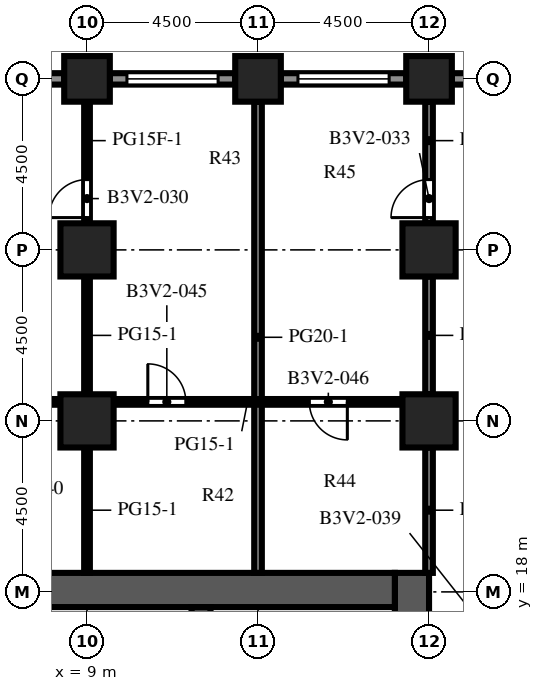
"""IFC4 building model, lengths in metres.
Left out: names, types, materials, properties, quantities, classifications, styles, units other than length and angle.
Written with IfcOpenShell. Run it as: python <this file> out.ifc"""

import sys

from ifc_helpers import new_model, si_unit, direction, frame, frame_2d, origin, origin_2d, place, context, subcontext, project, spatial, rectangle, extrude, element, fill, save


model = new_model("IFC4")
c1 = context("Model", 3, precision=1e-05, world=origin(), true_north=direction((0.0, 1.0)))
c2 = subcontext(c1, "Body", "Model", "MODEL_VIEW")
j1 = project(units=[si_unit("LENGTHUNIT", "METRE"), si_unit("PLANEANGLEUNIT", "RADIAN")], contexts=[c1])
p1 = place(None, origin())
s1 = spatial("IfcSite", under=j1, at=p1, CompositionType="ELEMENT")
p2 = place(p1, origin())
s2 = spatial("IfcBuilding", under=s1, at=p2, CompositionType="ELEMENT")
p3 = place(p2, frame((0.0, 0.0, 98.4)))
s3 = spatial("IfcBuildingStorey", under=s2, at=p3, CompositionType="ELEMENT", Elevation=98.4)
for number, where, z_axis, x_axis in (
    (1, (9.0, 31.5, 0.0), (0.0, 0.0, 1.0), (1.0, 0.0, 0.0)),
    (2, (13.5, 31.5, 0.0), (0.0, 0.0, 1.0), (1.0, 0.0, 0.0)),
    (3, (18.0, 31.5, 0.0), (0.0, 0.0, 1.0), (1.0, 0.0, 0.0)),
):
    element("IfcColumn", number, at=place(p3, frame(where, z_axis=z_axis, x_axis=x_axis)), inside=s3, PredefinedType="COLUMN", context=c2, shape_type="SweptSolid", body=[
        extrude(rectangle(XDim=1.2, YDim=1.2, at=origin_2d()), origin(), (0.0, 0.0, 1.0), 4.1),
    ])
for number, where, z_axis, x_axis in (
    (4, (9.0, 22.5, 0.0), (0.0, 0.0, 1.0), (1.0, 0.0, 0.0)),
    (5, (9.0, 27.0, 0.0), (0.0, 0.0, 1.0), (1.0, 0.0, 0.0)),
    (6, (18.0, 22.5, 0.0), (0.0, 0.0, 1.0), (1.0, 0.0, 0.0)),
    (7, (18.0, 27.0, 0.0), (0.0, 0.0, 1.0), (1.0, 0.0, 0.0)),
):
    element("IfcColumn", number, at=place(p3, frame(where, z_axis=z_axis, x_axis=x_axis)), inside=s3, PredefinedType="COLUMN", context=c2, shape_type="SweptSolid", body=[
        extrude(rectangle(XDim=1.4, YDim=1.4, at=origin_2d()), origin(), (0.0, 0.0, 1.0), 4.1),
    ])
p4 = place(p3, frame((17.55, -9.0, 0.0), z_axis=(0.0, 0.0, 1.0), x_axis=(0.0, 1.0, 0.0)))
e8 = element("IfcWall", 8, at=p4, inside=s3, PredefinedType="SHEAR", context=c2, shape_type="SweptSolid", body=[
    extrude(rectangle(XDim=27.5, YDim=0.9, at=frame_2d((13.75, 0.0))), origin(), (0.0, 0.0, 1.0), 4.1),
])
p5 = place(p4, frame((12.55, 0.0, 0.0)))
e9 = element("IfcOpeningElement", 9, at=p5, cuts=e8, PredefinedType="OPENING", context=c2, shape_type="SweptSolid", body=[
    extrude(rectangle(XDim=2.4, YDim=2.4, at=frame_2d((1.2, 1.2))), frame((0.0, 0.46, 0.0), z_axis=(0.0, -1.0, 0.0), x_axis=(1.0, 0.0, 0.0)), (0.0, 0.0, 1.0), 0.92),
])
p6 = place(p4, frame((6.825, 0.0, 0.0)))
e10 = element("IfcOpeningElement", 10, at=p6, cuts=e8, PredefinedType="OPENING", context=c2, shape_type="SweptSolid", body=[
    extrude(rectangle(XDim=1.2, YDim=2.1, at=frame_2d((0.6, 1.05))), frame((0.0, 0.46, 0.0), z_axis=(0.0, -1.0, 0.0), x_axis=(1.0, 0.0, 0.0)), (0.0, 0.0, 1.0), 0.92),
])
p7 = place(p4, frame((19.475, 0.0, 0.0)))
e11 = element("IfcOpeningElement", 11, at=p7, cuts=e8, PredefinedType="OPENING", context=c2, shape_type="SweptSolid", body=[
    extrude(rectangle(XDim=1.2, YDim=2.1, at=frame_2d((0.6, 1.05))), frame((0.0, 0.46, 0.0), z_axis=(0.0, -1.0, 0.0), x_axis=(1.0, 0.0, 0.0)), (0.0, 0.0, 1.0), 0.92),
])
p8 = place(p3, frame((6.9, 18.05, 0.0), z_axis=(0.0, 0.0, 1.0), x_axis=(1.0, 0.0, 0.0)))
e12 = element("IfcWall", 12, at=p8, inside=s3, PredefinedType="SHEAR", context=c2, shape_type="SweptSolid", body=[
    extrude(rectangle(XDim=10.2, YDim=0.9, at=frame_2d((5.1, 0.0))), origin(), (0.0, 0.0, 1.0), 4.1),
])
p9 = place(p3, frame((12.0, 10.25, 0.0), z_axis=(0.0, 0.0, 1.0), x_axis=(0.0, 1.0, 0.0)))
e13 = element("IfcWall", 13, at=p9, inside=s3, PredefinedType="SHEAR", context=c2, shape_type="SweptSolid", body=[
    extrude(rectangle(XDim=7.35, YDim=0.5, at=frame_2d((3.675, 0.0))), origin(), (0.0, 0.0, 1.0), 4.1),
])
p10 = place(p3, frame((18.6, 31.5, 0.0), z_axis=(0.0, 0.0, 1.0), x_axis=(1.0, 0.0, 0.0)))
e14 = element("IfcWall", 14, at=p10, inside=s3, PredefinedType="SOLIDWALL", context=c2, shape_type="SweptSolid", body=[
    extrude(rectangle(XDim=3.3, YDim=0.3, at=frame_2d((1.65, 0.0))), origin(), (0.0, 0.0, 1.0), 2.75),
])
p11 = place(p10, frame((1.15, 0.0, 0.0)))
e15 = element("IfcOpeningElement", 15, at=p11, cuts=e14, PredefinedType="OPENING", context=c2, shape_type="SweptSolid", body=[
    extrude(rectangle(XDim=1.0, YDim=2.2, at=frame_2d((0.5, 1.1))), frame((0.0, 0.16, 0.0), z_axis=(0.0, -1.0, 0.0), x_axis=(1.0, 0.0, 0.0)), (0.0, 0.0, 1.0), 0.32),
])
p12 = place(p3, frame((14.1, 31.5, 0.0), z_axis=(0.0, 0.0, 1.0), x_axis=(1.0, 0.0, 0.0)))
e16 = element("IfcWall", 16, at=p12, inside=s3, PredefinedType="SOLIDWALL", context=c2, shape_type="SweptSolid", body=[
    extrude(rectangle(XDim=3.3, YDim=0.3, at=frame_2d((1.65, 0.0))), origin(), (0.0, 0.0, 1.0), 2.75),
])
p13 = place(p12, frame((0.45, 0.0, 0.8)))
e17 = element("IfcOpeningElement", 17, at=p13, cuts=e16, PredefinedType="OPENING", context=c2, shape_type="SweptSolid", body=[
    extrude(rectangle(XDim=2.4, YDim=1.7, at=frame_2d((1.2, 0.85))), frame((0.0, 0.16, 0.0), z_axis=(0.0, -1.0, 0.0), x_axis=(1.0, 0.0, 0.0)), (0.0, 0.0, 1.0), 0.32),
])
p14 = place(p3, frame((9.6, 31.5, 0.0), z_axis=(0.0, 0.0, 1.0), x_axis=(1.0, 0.0, 0.0)))
e18 = element("IfcWall", 18, at=p14, inside=s3, PredefinedType="SOLIDWALL", context=c2, shape_type="SweptSolid", body=[
    extrude(rectangle(XDim=3.3, YDim=0.3, at=frame_2d((1.65, 0.0))), origin(), (0.0, 0.0, 1.0), 2.75),
])
p15 = place(p14, frame((0.45, 0.0, 0.8)))
e19 = element("IfcOpeningElement", 19, at=p15, cuts=e18, PredefinedType="OPENING", context=c2, shape_type="SweptSolid", body=[
    extrude(rectangle(XDim=2.4, YDim=1.7, at=frame_2d((1.2, 0.85))), frame((0.0, 0.16, 0.0), z_axis=(0.0, -1.0, 0.0), x_axis=(1.0, 0.0, 0.0)), (0.0, 0.0, 1.0), 0.32),
])
p16 = place(p3, frame((5.1, 31.5, 0.0), z_axis=(0.0, 0.0, 1.0), x_axis=(1.0, 0.0, 0.0)))
e20 = element("IfcWall", 20, at=p16, inside=s3, PredefinedType="SOLIDWALL", context=c2, shape_type="SweptSolid", body=[
    extrude(rectangle(XDim=3.3, YDim=0.3, at=frame_2d((1.65, 0.0))), origin(), (0.0, 0.0, 1.0), 2.75),
])
p17 = place(p16, frame((0.45, 0.0, 0.8)))
e21 = element("IfcOpeningElement", 21, at=p17, cuts=e20, PredefinedType="OPENING", context=c2, shape_type="SweptSolid", body=[
    extrude(rectangle(XDim=2.4, YDim=1.7, at=frame_2d((1.2, 0.85))), frame((0.0, 0.16, 0.0), z_axis=(0.0, -1.0, 0.0), x_axis=(1.0, 0.0, 0.0)), (0.0, 0.0, 1.0), 0.32),
])
p18 = place(p3, frame((8.2, 15.028, 0.0), z_axis=(0.0, 0.0, 1.0), x_axis=(0.0, 1.0, 0.0)))
e22 = element("IfcWall", 22, at=p18, inside=s3, PredefinedType="PARTITIONING", context=c2, shape_type="SweptSolid", body=[
    extrude(rectangle(XDim=2.573, YDim=0.1, at=frame_2d((1.286, 0.0))), origin(), (0.0, 0.0, 1.0), 3.65),
])
p19 = place(p18, frame((0.786, 0.0, 0.0)))
e23 = element("IfcOpeningElement", 23, at=p19, cuts=e22, PredefinedType="OPENING", context=c2, shape_type="SweptSolid", body=[
    extrude(rectangle(XDim=1.0, YDim=2.1, at=frame_2d((0.5, 1.05))), frame((0.0, 0.06, 0.0), z_axis=(0.0, -1.0, 0.0), x_axis=(1.0, 0.0, 0.0)), (0.0, 0.0, 1.0), 0.12),
])
p20 = place(p3, frame((9.0, 18.5, 0.0), z_axis=(0.0, 0.0, 1.0), x_axis=(0.0, 1.0, 0.0)))
e24 = element("IfcWall", 24, at=p20, inside=s3, PredefinedType="PARTITIONING", context=c2, shape_type="SweptSolid", body=[
    extrude(rectangle(XDim=3.3, YDim=0.15, at=frame_2d((1.65, 0.0))), origin(), (0.0, 0.0, 1.0), 3.65),
])
p21 = place(p3, frame((9.0, 23.2, 0.0), z_axis=(0.0, 0.0, 1.0), x_axis=(0.0, 1.0, 0.0)))
e25 = element("IfcWall", 25, at=p21, inside=s3, PredefinedType="PARTITIONING", context=c2, shape_type="SweptSolid", body=[
    extrude(rectangle(XDim=3.1, YDim=0.15, at=frame_2d((1.55, 0.0))), origin(), (0.0, 0.0, 1.0), 3.65),
])
p22 = place(p3, frame((9.0, 30.9, 0.0), z_axis=(0.0, 0.0, 1.0), x_axis=(0.0, -1.0, 0.0)))
e26 = element("IfcWall", 26, at=p22, inside=s3, PredefinedType="PARTITIONING", context=c2, shape_type="SweptSolid", body=[
    extrude(rectangle(XDim=3.2, YDim=0.15, at=frame_2d((1.6, 0.0))), origin(), (0.0, 0.0, 1.0), 3.65),
])
p23 = place(p22, frame((2.05, 0.0, 0.0)))
e27 = element("IfcOpeningElement", 27, at=p23, cuts=e26, PredefinedType="OPENING", context=c2, shape_type="SweptSolid", body=[
    extrude(rectangle(XDim=1.0, YDim=2.1, at=frame_2d((0.5, 1.05))), frame((0.0, 0.085, 0.0), z_axis=(0.0, -1.0, 0.0), x_axis=(1.0, 0.0, 0.0)), (0.0, 0.0, 1.0), 0.17),
])
p24 = place(p3, frame((13.5, 18.5, 0.0), z_axis=(0.0, 0.0, 1.0), x_axis=(0.0, 1.0, 0.0)))
e28 = element("IfcWall", 28, at=p24, inside=s3, PredefinedType="PARTITIONING", context=c2, shape_type="SweptSolid", body=[
    extrude(rectangle(XDim=12.4, YDim=0.2, at=frame_2d((6.2, 0.0))), origin(), (0.0, 0.0, 1.0), 3.65),
])
p25 = place(p3, frame((18.0, 18.5, 0.0), z_axis=(0.0, 0.0, 1.0), x_axis=(0.0, 1.0, 0.0)))
e29 = element("IfcWall", 29, at=p25, inside=s3, PredefinedType="PARTITIONING", context=c2, shape_type="SweptSolid", body=[
    extrude(rectangle(XDim=3.3, YDim=0.2, at=frame_2d((1.65, 0.0))), origin(), (0.0, 0.0, 1.0), 3.65),
])
p26 = place(p3, frame((18.0, 23.2, 0.0), z_axis=(0.0, 0.0, 1.0), x_axis=(0.0, 1.0, 0.0)))
e30 = element("IfcWall", 30, at=p26, inside=s3, PredefinedType="PARTITIONING", context=c2, shape_type="SweptSolid", body=[
    extrude(rectangle(XDim=3.1, YDim=0.2, at=frame_2d((1.55, 0.0))), origin(), (0.0, 0.0, 1.0), 3.65),
])
p27 = place(p3, frame((18.0, 27.7, 0.0), z_axis=(0.0, 0.0, 1.0), x_axis=(0.0, 1.0, 0.0)))
e31 = element("IfcWall", 31, at=p27, inside=s3, PredefinedType="PARTITIONING", context=c2, shape_type="SweptSolid", body=[
    extrude(rectangle(XDim=3.2, YDim=0.2, at=frame_2d((1.6, 0.0))), origin(), (0.0, 0.0, 1.0), 3.65),
])
p28 = place(p27, frame((0.15, 0.0, 0.0)))
e32 = element("IfcOpeningElement", 32, at=p28, cuts=e31, PredefinedType="OPENING", context=c2, shape_type="SweptSolid", body=[
    extrude(rectangle(XDim=1.0, YDim=2.1, at=frame_2d((0.5, 1.05))), frame((0.0, 0.11, 0.0), z_axis=(0.0, -1.0, 0.0), x_axis=(1.0, 0.0, 0.0)), (0.0, 0.0, 1.0), 0.22),
])
p29 = place(p3, frame((8.3, 23.0, 0.0), z_axis=(0.0, 0.0, 1.0), x_axis=(-1.0, 0.0, 0.0)))
e33 = element("IfcWall", 33, at=p29, inside=s3, PredefinedType="PARTITIONING", context=c2, shape_type="SweptSolid", body=[
    extrude(rectangle(XDim=7.6, YDim=0.15, at=frame_2d((3.8, 0.0))), origin(), (0.0, 0.0, 1.0), 3.65),
])
p30 = place(p29, frame((3.95, 0.0, 0.0)))
e34 = element("IfcOpeningElement", 34, at=p30, cuts=e33, PredefinedType="OPENING", context=c2, shape_type="SweptSolid", body=[
    extrude(rectangle(XDim=1.0, YDim=2.1, at=frame_2d((0.5, 1.05))), frame((0.0, 0.085, 0.0), z_axis=(0.0, -1.0, 0.0), x_axis=(1.0, 0.0, 0.0)), (0.0, 0.0, 1.0), 0.17),
])
p31 = place(p3, frame((17.3, 23.0, 0.0), z_axis=(0.0, 0.0, 1.0), x_axis=(-1.0, 0.0, 0.0)))
e35 = element("IfcWall", 35, at=p31, inside=s3, PredefinedType="PARTITIONING", context=c2, shape_type="SweptSolid", body=[
    extrude(rectangle(XDim=7.6, YDim=0.15, at=frame_2d((3.8, 0.0))), origin(), (0.0, 0.0, 1.0), 3.65),
])
p32 = place(p31, frame((5.7, 0.0, 0.0)))
e36 = element("IfcOpeningElement", 36, at=p32, cuts=e35, PredefinedType="OPENING", context=c2, shape_type="SweptSolid", body=[
    extrude(rectangle(XDim=1.0, YDim=2.1, at=frame_2d((0.5, 1.05))), frame((0.0, 0.085, 0.0), z_axis=(0.0, -1.0, 0.0), x_axis=(1.0, 0.0, 0.0)), (0.0, 0.0, 1.0), 0.17),
])
p33 = place(p31, frame((1.45, 0.0, 0.0)))
e37 = element("IfcOpeningElement", 37, at=p33, cuts=e35, PredefinedType="OPENING", context=c2, shape_type="SweptSolid", body=[
    extrude(rectangle(XDim=1.0, YDim=2.1, at=frame_2d((0.5, 1.05))), frame((0.0, 0.085, 0.0), z_axis=(0.0, -1.0, 0.0), x_axis=(1.0, 0.0, 0.0)), (0.0, 0.0, 1.0), 0.17),
])
p34 = place(p13, origin())
e38 = element("IfcWindow", 38, at=p34, inside=s3, PartitioningType="SINGLE_PANEL", PredefinedType="WINDOW", context=c2, shape_type="SweptSolid", body=[
    extrude(rectangle(XDim=2.4, YDim=1.7, at=frame_2d((1.2, 0.85))), frame((0.0, 0.03, 0.0), z_axis=(0.0, -1.0, 0.0), x_axis=(1.0, 0.0, 0.0)), (0.0, 0.0, 1.0), 0.06),
])
fill(e17, e38)
p35 = place(p15, origin())
e39 = element("IfcWindow", 39, at=p35, inside=s3, PartitioningType="SINGLE_PANEL", PredefinedType="WINDOW", context=c2, shape_type="SweptSolid", body=[
    extrude(rectangle(XDim=2.4, YDim=1.7, at=frame_2d((1.2, 0.85))), frame((0.0, 0.03, 0.0), z_axis=(0.0, -1.0, 0.0), x_axis=(1.0, 0.0, 0.0)), (0.0, 0.0, 1.0), 0.06),
])
fill(e19, e39)
p36 = place(p23, origin())
e40 = element("IfcDoor", 40, at=p36, inside=s3, OperationType="SINGLE_SWING_RIGHT", PredefinedType="DOOR", context=c2, shape_type="SweptSolid", body=[
    extrude(rectangle(XDim=1.0, YDim=2.1, at=frame_2d((0.5, 1.05))), frame((0.0, 0.025, 0.0), z_axis=(0.0, -1.0, 0.0), x_axis=(1.0, 0.0, 0.0)), (0.0, 0.0, 1.0), 0.05),
])
fill(e27, e40)
p37 = place(p28, origin())
e41 = element("IfcDoor", 41, at=p37, inside=s3, OperationType="SINGLE_SWING_LEFT", PredefinedType="DOOR", context=c2, shape_type="SweptSolid", body=[
    extrude(rectangle(XDim=1.0, YDim=2.1, at=frame_2d((0.5, 1.05))), frame((0.0, 0.025, 0.0), z_axis=(0.0, -1.0, 0.0), x_axis=(1.0, 0.0, 0.0)), (0.0, 0.0, 1.0), 0.05),
])
fill(e32, e41)
p38 = place(p32, origin())
e42 = element("IfcDoor", 42, at=p38, inside=s3, OperationType="SINGLE_SWING_RIGHT", PredefinedType="DOOR", context=c2, shape_type="SweptSolid", body=[
    extrude(rectangle(XDim=1.0, YDim=2.1, at=frame_2d((0.5, 1.05))), frame((0.0, 0.025, 0.0), z_axis=(0.0, -1.0, 0.0), x_axis=(1.0, 0.0, 0.0)), (0.0, 0.0, 1.0), 0.05),
])
fill(e36, e42)
p39 = place(p33, origin())
e43 = element("IfcDoor", 43, at=p39, inside=s3, OperationType="SINGLE_SWING_LEFT", PredefinedType="DOOR", context=c2, shape_type="SweptSolid", body=[
    extrude(rectangle(XDim=1.0, YDim=2.1, at=frame_2d((0.5, 1.05))), frame((0.0, 0.025, 0.0), z_axis=(0.0, -1.0, 0.0), x_axis=(1.0, 0.0, 0.0)), (0.0, 0.0, 1.0), 0.05),
])
fill(e37, e43)
save(model, sys.argv[1])
